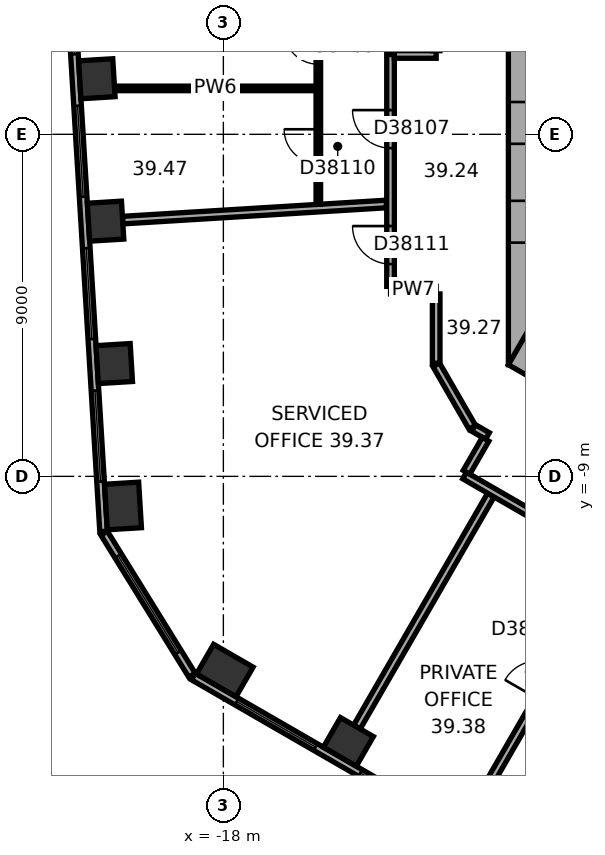
"""IFC4 building model, lengths in metres.
Left out: names, types, materials, properties, quantities, classifications, styles, units other than length and angle.
Written with IfcOpenShell. Run it as: python <this file> out.ifc"""

import sys

from ifc_helpers import new_model, si_unit, direction, frame, frame_2d, origin, origin_2d, place, context, subcontext, project, spatial, rectangle, extrude, element, fill, save


model = new_model("IFC4")
c1 = context("Model", 3, precision=1e-05, world=origin(), true_north=direction((0.0, 1.0)))
c2 = subcontext(c1, "Body", "Model", "MODEL_VIEW")
j1 = project(units=[si_unit("LENGTHUNIT", "METRE"), si_unit("PLANEANGLEUNIT", "RADIAN")], contexts=[c1])
p1 = place(None, origin())
s1 = spatial("IfcSite", under=j1, at=p1, CompositionType="ELEMENT")
p2 = place(p1, origin())
s2 = spatial("IfcBuilding", under=s1, at=p2, CompositionType="ELEMENT")
p3 = place(p2, frame((0.0, 0.0, 161.4)))
s3 = spatial("IfcBuildingStorey", under=s2, at=p3, CompositionType="ELEMENT", Elevation=161.4)
for number, where, z_axis, x_axis in (
    (1, (-21.329, 1.462, 0.0), (0.0, 0.0, 1.0), (0.061, -0.998, 0.0)),
    (2, (-21.1, -2.285, 0.0), (0.0, 0.0, 1.0), (0.061, -0.998, 0.0)),
    (3, (-20.871, -6.032, 0.0), (0.0, 0.0, 1.0), (0.061, -0.998, 0.0)),
):
    element("IfcColumn", number, at=place(p3, frame(where, z_axis=z_axis, x_axis=x_axis)), inside=s3, PredefinedType="COLUMN", context=c2, shape_type="SweptSolid", body=[
        extrude(rectangle(XDim=1.0, YDim=0.9, at=origin_2d()), origin(), (0.0, 0.0, 1.0), 3.7),
    ])
for number, where, z_axis, x_axis in (
    (4, (-20.642, -9.779, 0.0), (0.0, 0.0, 1.0), (0.061, -0.998, 0.0)),
    (5, (-17.962, -14.109, 0.0), (0.0, 0.0, 1.0), (0.866, -0.5, 0.0)),
):
    element("IfcColumn", number, at=place(p3, frame(where, z_axis=z_axis, x_axis=x_axis)), inside=s3, PredefinedType="COLUMN", context=c2, shape_type="SweptSolid", body=[
        extrude(rectangle(XDim=1.2, YDim=0.9, at=origin_2d()), origin(), (0.0, 0.0, 1.0), 3.7),
    ])
p4 = place(p3, frame((-14.711, -15.986, 0.0), z_axis=(0.0, 0.0, 1.0), x_axis=(0.866025403784, -0.5, 0.0)))
e6 = element("IfcColumn", 6, at=p4, inside=s3, PredefinedType="COLUMN", context=c2, shape_type="SweptSolid", body=[
    extrude(rectangle(XDim=1.0, YDim=0.9, at=origin_2d()), origin(), (0.0, 0.0, 1.0), 3.7),
])
p5 = place(p3, frame((-10.0, 6.062, 0.0), z_axis=(0.0, 0.0, 1.0), x_axis=(0.0, -1.0, 0.0)))
e7 = element("IfcWall", 7, at=p5, inside=s3, PredefinedType="SHEAR", context=c2, shape_type="SweptSolid", body=[
    extrude(rectangle(XDim=12.125, YDim=1.0, at=frame_2d((6.062, 0.0))), origin(), (0.0, 0.0, 1.0), 3.7),
])
p6 = place(p5, frame((5.212, 0.0, 0.0)))
e8 = element("IfcOpeningElement", 8, at=p6, cuts=e7, PredefinedType="OPENING", context=c2, shape_type="SweptSolid", body=[
    extrude(rectangle(XDim=1.1, YDim=2.1, at=frame_2d((0.55, 1.05))), frame((0.0, 0.51, 0.0), z_axis=(0.0, -1.0, 0.0), x_axis=(1.0, 0.0, 0.0)), (0.0, 0.0, 1.0), 1.02),
])
p7 = place(p5, frame((7.812, 0.0, 0.0)))
e9 = element("IfcOpeningElement", 9, at=p7, cuts=e7, PredefinedType="OPENING", context=c2, shape_type="SweptSolid", body=[
    extrude(rectangle(XDim=1.1, YDim=2.1, at=frame_2d((0.55, 1.05))), frame((0.0, 0.51, 0.0), z_axis=(0.0, -1.0, 0.0), x_axis=(1.0, 0.0, 0.0)), (0.0, 0.0, 1.0), 1.02),
])
p8 = place(p3, frame((-10.25, -5.629, 0.0), z_axis=(0.0, 0.0, 1.0), x_axis=(0.866022616891, -0.50000482701, 0.0)))
e10 = element("IfcWall", 10, at=p8, inside=s3, PredefinedType="SHEAR", context=c2, shape_type="SweptSolid", body=[
    extrude(rectangle(XDim=12.125, YDim=1.0, at=frame_2d((6.062, 0.0))), origin(), (0.0, 0.0, 1.0), 3.7),
])
p9 = place(p8, frame((6.262, 0.0, 0.0)))
e11 = element("IfcOpeningElement", 11, at=p9, cuts=e10, PredefinedType="OPENING", context=c2, shape_type="SweptSolid", body=[
    extrude(rectangle(XDim=1.5, YDim=2.1, at=frame_2d((0.75, 1.05))), frame((0.0, 0.51, 0.0), z_axis=(0.0, -1.0, 0.0), x_axis=(1.0, 0.0, 0.0)), (0.0, 0.0, 1.0), 1.02),
])
p10 = place(p8, frame((1.712, 0.0, 0.0)))
e12 = element("IfcOpeningElement", 12, at=p10, cuts=e10, PredefinedType="OPENING", context=c2, shape_type="SweptSolid", body=[
    extrude(rectangle(XDim=1.1, YDim=2.1, at=frame_2d((0.55, 1.05))), frame((0.0, 0.51, 0.0), z_axis=(0.0, -1.0, 0.0), x_axis=(1.0, 0.0, 0.0)), (0.0, 0.0, 1.0), 1.02),
])
p11 = place(p8, frame((4.312, 0.0, 0.0)))
e13 = element("IfcOpeningElement", 13, at=p11, cuts=e10, PredefinedType="OPENING", context=c2, shape_type="SweptSolid", body=[
    extrude(rectangle(XDim=1.1, YDim=2.1, at=frame_2d((0.55, 1.05))), frame((0.0, 0.51, 0.0), z_axis=(0.0, -1.0, 0.0), x_axis=(1.0, 0.0, 0.0)), (0.0, 0.0, 1.0), 1.02),
])
p12 = place(p3, frame((-22.375, 9.557, 0.0), z_axis=(0.0, 0.0, 1.0), x_axis=(0.061036015339, -0.998135564356, 0.0)))
e14 = element("IfcWall", 14, at=p12, inside=s3, PredefinedType="STANDARD", context=c2, shape_type="SweptSolid", body=[
    extrude(rectangle(XDim=20.044, YDim=0.2, at=frame_2d((10.022, 0.0))), origin(), (0.0, 0.0, 1.0), 3.7),
])
p13 = place(p12, frame((1.313, 0.0, 0.9)))
e15 = element("IfcOpeningElement", 15, at=p13, cuts=e14, PredefinedType="OPENING", context=c2, shape_type="SweptSolid", body=[
    extrude(rectangle(XDim=2.4, YDim=2.0, at=frame_2d((1.2, 1.0))), frame((0.0, 0.11, 0.0), z_axis=(0.0, -1.0, 0.0), x_axis=(1.0, 0.0, 0.0)), (0.0, 0.0, 1.0), 0.22),
])
p14 = place(p12, frame((5.067, 0.0, 0.9)))
e16 = element("IfcOpeningElement", 16, at=p14, cuts=e14, PredefinedType="OPENING", context=c2, shape_type="SweptSolid", body=[
    extrude(rectangle(XDim=2.4, YDim=2.0, at=frame_2d((1.2, 1.0))), frame((0.0, 0.11, 0.0), z_axis=(0.0, -1.0, 0.0), x_axis=(1.0, 0.0, 0.0)), (0.0, 0.0, 1.0), 0.22),
])
p15 = place(p12, frame((8.821, 0.0, 0.9)))
e17 = element("IfcOpeningElement", 17, at=p15, cuts=e14, PredefinedType="OPENING", context=c2, shape_type="SweptSolid", body=[
    extrude(rectangle(XDim=2.4, YDim=2.0, at=frame_2d((1.2, 1.0))), frame((0.0, 0.11, 0.0), z_axis=(0.0, -1.0, 0.0), x_axis=(1.0, 0.0, 0.0)), (0.0, 0.0, 1.0), 0.22),
])
p16 = place(p12, frame((12.575, 0.0, 0.9)))
e18 = element("IfcOpeningElement", 18, at=p16, cuts=e14, PredefinedType="OPENING", context=c2, shape_type="SweptSolid", body=[
    extrude(rectangle(XDim=2.4, YDim=2.0, at=frame_2d((1.2, 1.0))), frame((0.0, 0.11, 0.0), z_axis=(0.0, -1.0, 0.0), x_axis=(1.0, 0.0, 0.0)), (0.0, 0.0, 1.0), 0.22),
])
p17 = place(p12, frame((16.329, 0.0, 0.9)))
e19 = element("IfcOpeningElement", 19, at=p17, cuts=e14, PredefinedType="OPENING", context=c2, shape_type="SweptSolid", body=[
    extrude(rectangle(XDim=2.4, YDim=2.0, at=frame_2d((1.2, 1.0))), frame((0.0, 0.11, 0.0), z_axis=(0.0, -1.0, 0.0), x_axis=(1.0, 0.0, 0.0)), (0.0, 0.0, 1.0), 0.22),
])
p18 = place(p3, frame((-21.137, -10.496, 0.0), z_axis=(0.0, 0.0, 1.0), x_axis=(0.526178661629, -0.850374044786, 0.0)))
e20 = element("IfcWall", 20, at=p18, inside=s3, PredefinedType="STANDARD", context=c2, shape_type="SweptSolid", body=[
    extrude(rectangle(XDim=4.395, YDim=0.2, at=frame_2d((2.197, 0.0))), origin(), (0.0, 0.0, 1.0), 3.7),
])
p19 = place(p18, frame((0.698, 0.0, 0.9)))
e21 = element("IfcOpeningElement", 21, at=p19, cuts=e20, PredefinedType="OPENING", context=c2, shape_type="SweptSolid", body=[
    extrude(rectangle(XDim=3.0, YDim=2.0, at=frame_2d((1.5, 1.0))), frame((0.0, 0.11, 0.0), z_axis=(0.0, -1.0, 0.0), x_axis=(1.0, 0.0, 0.0)), (0.0, 0.0, 1.0), 0.22),
])
p20 = place(p3, frame((-18.789, -14.267, 0.0), z_axis=(0.0, 0.0, 1.0), x_axis=(0.866023315909, -0.500003616288, 0.0)))
e22 = element("IfcWall", 22, at=p20, inside=s3, PredefinedType="STANDARD", context=c2, shape_type="SweptSolid", body=[
    extrude(rectangle(XDim=20.044, YDim=0.2, at=frame_2d((10.022, 0.0))), origin(), (0.0, 0.0, 1.0), 3.7),
])
p21 = place(p20, frame((1.314, 0.0, 0.9)))
e23 = element("IfcOpeningElement", 23, at=p21, cuts=e22, PredefinedType="OPENING", context=c2, shape_type="SweptSolid", body=[
    extrude(rectangle(XDim=2.4, YDim=2.0, at=frame_2d((1.2, 1.0))), frame((0.0, 0.11, 0.0), z_axis=(0.0, -1.0, 0.0), x_axis=(1.0, 0.0, 0.0)), (0.0, 0.0, 1.0), 0.22),
])
p22 = place(p20, frame((5.069, 0.0, 0.9)))
e24 = element("IfcOpeningElement", 24, at=p22, cuts=e22, PredefinedType="OPENING", context=c2, shape_type="SweptSolid", body=[
    extrude(rectangle(XDim=2.4, YDim=2.0, at=frame_2d((1.2, 1.0))), frame((0.0, 0.11, 0.0), z_axis=(0.0, -1.0, 0.0), x_axis=(1.0, 0.0, 0.0)), (0.0, 0.0, 1.0), 0.22),
])
p23 = place(p20, frame((8.823, 0.0, 0.9)))
e25 = element("IfcOpeningElement", 25, at=p23, cuts=e22, PredefinedType="OPENING", context=c2, shape_type="SweptSolid", body=[
    extrude(rectangle(XDim=2.4, YDim=2.0, at=frame_2d((1.2, 1.0))), frame((0.0, 0.11, 0.0), z_axis=(0.0, -1.0, 0.0), x_axis=(1.0, 0.0, 0.0)), (0.0, 0.0, 1.0), 0.22),
])
p24 = place(p20, frame((12.577, 0.0, 0.9)))
e26 = element("IfcOpeningElement", 26, at=p24, cuts=e22, PredefinedType="OPENING", context=c2, shape_type="SweptSolid", body=[
    extrude(rectangle(XDim=2.4, YDim=2.0, at=frame_2d((1.2, 1.0))), frame((0.0, 0.11, 0.0), z_axis=(0.0, -1.0, 0.0), x_axis=(1.0, 0.0, 0.0)), (0.0, 0.0, 1.0), 0.22),
])
p25 = place(p20, frame((16.331, 0.0, 0.9)))
e27 = element("IfcOpeningElement", 27, at=p25, cuts=e22, PredefinedType="OPENING", context=c2, shape_type="SweptSolid", body=[
    extrude(rectangle(XDim=2.4, YDim=2.0, at=frame_2d((1.2, 1.0))), frame((0.0, 0.11, 0.0), z_axis=(0.0, -1.0, 0.0), x_axis=(1.0, 0.0, 0.0)), (0.0, 0.0, 1.0), 0.22),
])
p26 = place(p3, frame((-20.863, 1.208, 0.0), z_axis=(0.0, 0.0, 1.0), x_axis=(1.0, 0.0, 0.0)))
e28 = element("IfcWall", 28, at=p26, inside=s3, PredefinedType="PARTITIONING", context=c2, shape_type="SweptSolid", body=[
    extrude(rectangle(XDim=5.302, YDim=0.12, at=frame_2d((2.651, 0.0))), origin(), (0.0, 0.0, 1.0), 2.87),
])
p27 = place(p3, frame((-20.651, -2.258, 0.0), z_axis=(0.0, 0.0, 1.0), x_axis=(0.998133960965, 0.061062230286, 0.0)))
e29 = element("IfcWall", 29, at=p27, inside=s3, PredefinedType="PARTITIONING", context=c2, shape_type="SweptSolid", body=[
    extrude(rectangle(XDim=6.953, YDim=0.2, at=frame_2d((3.477, 0.0))), origin(), (0.0, 0.0, 1.0), 3.42),
])
p28 = place(p3, frame((-15.501, 5.479, 0.0), z_axis=(0.0, 0.0, 1.0), x_axis=(0.0, -1.0, 0.0)))
e30 = element("IfcWall", 30, at=p28, inside=s3, PredefinedType="PARTITIONING", context=c2, shape_type="SweptSolid", body=[
    extrude(rectangle(XDim=7.322, YDim=0.12, at=frame_2d((3.661, 0.0))), origin(), (0.0, 0.0, 1.0), 3.42),
])
p29 = place(p28, frame((0.55, 0.0, 0.0)))
e31 = element("IfcOpeningElement", 31, at=p29, cuts=e30, PredefinedType="OPENING", context=c2, shape_type="SweptSolid", body=[
    extrude(rectangle(XDim=1.0, YDim=2.1, at=frame_2d((0.5, 1.05))), frame((0.0, 0.07, 0.0), z_axis=(0.0, -1.0, 0.0), x_axis=(1.0, 0.0, 0.0)), (0.0, 0.0, 1.0), 0.14),
])
p30 = place(p28, frame((2.736, 0.0, 0.0)))
e32 = element("IfcOpeningElement", 32, at=p30, cuts=e30, PredefinedType="OPENING", context=c2, shape_type="SweptSolid", body=[
    extrude(rectangle(XDim=0.9, YDim=2.1, at=frame_2d((0.45, 1.05))), frame((0.0, 0.07, 0.0), z_axis=(0.0, -1.0, 0.0), x_axis=(1.0, 0.0, 0.0)), (0.0, 0.0, 1.0), 0.14),
])
p31 = place(p28, frame((5.347, 0.0, 0.0)))
e33 = element("IfcOpeningElement", 33, at=p31, cuts=e30, PredefinedType="OPENING", context=c2, shape_type="SweptSolid", body=[
    extrude(rectangle(XDim=0.9, YDim=2.1, at=frame_2d((0.45, 1.05))), frame((0.0, 0.07, 0.0), z_axis=(0.0, -1.0, 0.0), x_axis=(1.0, 0.0, 0.0)), (0.0, 0.0, 1.0), 0.14),
])
p32 = place(p3, frame((-14.486, -15.597, 0.0), z_axis=(0.0, 0.0, 1.0), x_axis=(0.499983284935, 0.866035054017, 0.0)))
e34 = element("IfcWall", 34, at=p32, inside=s3, PredefinedType="PARTITIONING", context=c2, shape_type="SweptSolid", body=[
    extrude(rectangle(XDim=7.049, YDim=0.2, at=frame_2d((3.524, 0.0))), origin(), (0.0, 0.0, 1.0), 3.42),
])
p33 = place(p3, frame((-13.601, -4.101, 0.0), z_axis=(0.0, 0.0, 1.0), x_axis=(1.0, 0.0, 0.0)))
e35 = element("IfcWall", 35, at=p33, inside=s3, PredefinedType="PARTITIONING", context=c2, shape_type="SweptSolid", body=[
    extrude(rectangle(XDim=1.201, YDim=0.2, at=frame_2d((0.601, 0.0))), origin(), (0.0, 0.0, 1.0), 3.42),
])
p34 = place(p3, frame((-13.601, 2.101, 0.0), z_axis=(0.0, 0.0, 1.0), x_axis=(0.0, -1.0, 0.0)))
e36 = element("IfcWall", 36, at=p34, inside=s3, PredefinedType="PARTITIONING", context=c2, shape_type="SweptSolid", body=[
    extrude(rectangle(XDim=6.102, YDim=0.2, at=frame_2d((3.051, 0.0))), origin(), (0.0, 0.0, 1.0), 3.42),
])
p35 = place(p34, frame((1.464, 0.0, 0.0)))
e37 = element("IfcOpeningElement", 37, at=p35, cuts=e36, PredefinedType="OPENING", context=c2, shape_type="SweptSolid", body=[
    extrude(rectangle(XDim=1.0, YDim=2.1, at=frame_2d((0.5, 1.05))), frame((0.0, 0.11, 0.0), z_axis=(0.0, -1.0, 0.0), x_axis=(1.0, 0.0, 0.0)), (0.0, 0.0, 1.0), 0.22),
])
p36 = place(p34, frame((4.515, 0.0, 0.0)))
e38 = element("IfcOpeningElement", 38, at=p36, cuts=e36, PredefinedType="OPENING", context=c2, shape_type="SweptSolid", body=[
    extrude(rectangle(XDim=1.0, YDim=2.1, at=frame_2d((0.5, 1.05))), frame((0.0, 0.11, 0.0), z_axis=(0.0, -1.0, 0.0), x_axis=(1.0, 0.0, 0.0)), (0.0, 0.0, 1.0), 0.22),
])
p37 = place(p3, frame((-12.4, -6.062, 0.0), z_axis=(0.0, 0.0, 1.0), x_axis=(0.500022797313, -0.86601224135, 0.0)))
e39 = element("IfcWall", 39, at=p37, inside=s3, PredefinedType="PARTITIONING", context=c2, shape_type="SweptSolid", body=[
    extrude(rectangle(XDim=1.9, YDim=0.2, at=frame_2d((0.95, 0.0))), origin(), (0.0, 0.0, 1.0), 3.42),
])
p38 = place(p3, frame((-12.4, -4.201, 0.0), z_axis=(0.0, 0.0, 1.0), x_axis=(0.0, -1.0, 0.0)))
e40 = element("IfcWall", 40, at=p38, inside=s3, PredefinedType="PARTITIONING", context=c2, shape_type="SweptSolid", body=[
    extrude(rectangle(XDim=1.821, YDim=0.2, at=frame_2d((0.911, 0.0))), origin(), (0.0, 0.0, 1.0), 3.42),
])
p39 = place(p3, frame((-12.4, 2.101, 0.0), z_axis=(0.0, 0.0, 1.0), x_axis=(-1.0, 0.0, 0.0)))
e41 = element("IfcWall", 41, at=p39, inside=s3, PredefinedType="PARTITIONING", context=c2, shape_type="SweptSolid", body=[
    extrude(rectangle(XDim=1.101, YDim=0.2, at=frame_2d((0.551, 0.0))), origin(), (0.0, 0.0, 1.0), 3.42),
])
p40 = place(p3, frame((-11.651, -8.978, 0.0), z_axis=(0.0, 0.0, 1.0), x_axis=(0.866010893236, -0.500025132165, 0.0)))
e42 = element("IfcWall", 42, at=p40, inside=s3, PredefinedType="PARTITIONING", context=c2, shape_type="SweptSolid", body=[
    extrude(rectangle(XDim=4.608, YDim=0.2, at=frame_2d((2.304, 0.0))), origin(), (0.0, 0.0, 1.0), 3.42),
])
p41 = place(p3, frame((-11.415, -7.728, 0.0), z_axis=(0.0, 0.0, 1.0), x_axis=(0.865915281873, -0.500190688257, 0.0)))
e43 = element("IfcWall", 43, at=p41, inside=s3, PredefinedType="PARTITIONING", context=c2, shape_type="SweptSolid", body=[
    extrude(rectangle(XDim=0.421, YDim=0.2, at=frame_2d((0.21, 0.0))), origin(), (0.0, 0.0, 1.0), 3.42),
])
p42 = place(p3, frame((-11.235, -17.474, 0.0), z_axis=(0.0, 0.0, 1.0), x_axis=(0.500009260695, 0.866020057054, 0.0)))
e44 = element("IfcWall", 44, at=p42, inside=s3, PredefinedType="PARTITIONING", context=c2, shape_type="SweptSolid", body=[
    extrude(rectangle(XDim=7.049, YDim=0.2, at=frame_2d((3.524, 0.0))), origin(), (0.0, 0.0, 1.0), 2.87),
])
p43 = place(p42, frame((3.024, 0.0, 0.0)))
e45 = element("IfcOpeningElement", 45, at=p43, cuts=e44, PredefinedType="OPENING", context=c2, shape_type="SweptSolid", body=[
    extrude(rectangle(XDim=1.0, YDim=2.1, at=frame_2d((0.5, 1.05))), frame((0.0, 0.11, 0.0), z_axis=(0.0, -1.0, 0.0), x_axis=(1.0, 0.0, 0.0)), (0.0, 0.0, 1.0), 0.22),
])
p44 = place(p3, frame((-11.101, -8.025, 0.0), z_axis=(0.0, 0.0, 1.0), x_axis=(-0.500074377092, -0.865982457891, 0.0)))
e46 = element("IfcWall", 46, at=p44, inside=s3, PredefinedType="PARTITIONING", context=c2, shape_type="SweptSolid", body=[
    extrude(rectangle(XDim=1.001, YDim=0.2, at=frame_2d((0.5, 0.0))), origin(), (0.0, 0.0, 1.0), 3.42),
])
p45 = place(p14, origin())
e47 = element("IfcWindow", 47, at=p45, inside=s3, PartitioningType="SINGLE_PANEL", PredefinedType="WINDOW", context=c2, shape_type="SweptSolid", body=[
    extrude(rectangle(XDim=2.4, YDim=2.0, at=frame_2d((1.2, 1.0))), frame((0.0, 0.03, 0.0), z_axis=(0.0, -1.0, 0.0), x_axis=(1.0, 0.0, 0.0)), (0.0, 0.0, 1.0), 0.06),
])
fill(e16, e47)
p46 = place(p15, origin())
e48 = element("IfcWindow", 48, at=p46, inside=s3, PartitioningType="SINGLE_PANEL", PredefinedType="WINDOW", context=c2, shape_type="SweptSolid", body=[
    extrude(rectangle(XDim=2.4, YDim=2.0, at=frame_2d((1.2, 1.0))), frame((0.0, 0.03, 0.0), z_axis=(0.0, -1.0, 0.0), x_axis=(1.0, 0.0, 0.0)), (0.0, 0.0, 1.0), 0.06),
])
fill(e17, e48)
p47 = place(p16, origin())
e49 = element("IfcWindow", 49, at=p47, inside=s3, PartitioningType="SINGLE_PANEL", PredefinedType="WINDOW", context=c2, shape_type="SweptSolid", body=[
    extrude(rectangle(XDim=2.4, YDim=2.0, at=frame_2d((1.2, 1.0))), frame((0.0, 0.03, 0.0), z_axis=(0.0, -1.0, 0.0), x_axis=(1.0, 0.0, 0.0)), (0.0, 0.0, 1.0), 0.06),
])
fill(e18, e49)
p48 = place(p17, origin())
e50 = element("IfcWindow", 50, at=p48, inside=s3, PartitioningType="SINGLE_PANEL", PredefinedType="WINDOW", context=c2, shape_type="SweptSolid", body=[
    extrude(rectangle(XDim=2.4, YDim=2.0, at=frame_2d((1.2, 1.0))), frame((0.0, 0.03, 0.0), z_axis=(0.0, -1.0, 0.0), x_axis=(1.0, 0.0, 0.0)), (0.0, 0.0, 1.0), 0.06),
])
fill(e19, e50)
p49 = place(p19, origin())
e51 = element("IfcWindow", 51, at=p49, inside=s3, PartitioningType="SINGLE_PANEL", PredefinedType="WINDOW", context=c2, shape_type="SweptSolid", body=[
    extrude(rectangle(XDim=3.0, YDim=2.0, at=frame_2d((1.5, 1.0))), frame((0.0, 0.03, 0.0), z_axis=(0.0, -1.0, 0.0), x_axis=(1.0, 0.0, 0.0)), (0.0, 0.0, 1.0), 0.06),
])
fill(e21, e51)
p50 = place(p21, origin())
e52 = element("IfcWindow", 52, at=p50, inside=s3, PartitioningType="SINGLE_PANEL", PredefinedType="WINDOW", context=c2, shape_type="SweptSolid", body=[
    extrude(rectangle(XDim=2.4, YDim=2.0, at=frame_2d((1.2, 1.0))), frame((0.0, 0.03, 0.0), z_axis=(0.0, -1.0, 0.0), x_axis=(1.0, 0.0, 0.0)), (0.0, 0.0, 1.0), 0.06),
])
fill(e23, e52)
p51 = place(p22, origin())
e53 = element("IfcWindow", 53, at=p51, inside=s3, PartitioningType="SINGLE_PANEL", PredefinedType="WINDOW", context=c2, shape_type="SweptSolid", body=[
    extrude(rectangle(XDim=2.4, YDim=2.0, at=frame_2d((1.2, 1.0))), frame((0.0, 0.03, 0.0), z_axis=(0.0, -1.0, 0.0), x_axis=(1.0, 0.0, 0.0)), (0.0, 0.0, 1.0), 0.06),
])
fill(e24, e53)
p52 = place(p35, origin())
e54 = element("IfcDoor", 54, at=p52, inside=s3, OperationType="SINGLE_SWING_LEFT", PredefinedType="DOOR", context=c2, shape_type="SweptSolid", body=[
    extrude(rectangle(XDim=1.0, YDim=2.1, at=frame_2d((0.5, 1.05))), frame((0.0, 0.025, 0.0), z_axis=(0.0, -1.0, 0.0), x_axis=(1.0, 0.0, 0.0)), (0.0, 0.0, 1.0), 0.05),
])
fill(e37, e54)
p53 = place(p30, origin())
e55 = element("IfcDoor", 55, at=p53, inside=s3, OperationType="SINGLE_SWING_LEFT", PredefinedType="DOOR", context=c2, shape_type="SweptSolid", body=[
    extrude(rectangle(XDim=0.9, YDim=2.1, at=frame_2d((0.45, 1.05))), frame((0.0, 0.025, 0.0), z_axis=(0.0, -1.0, 0.0), x_axis=(1.0, 0.0, 0.0)), (0.0, 0.0, 1.0), 0.05),
])
fill(e32, e55)
p54 = place(p31, origin())
e56 = element("IfcDoor", 56, at=p54, inside=s3, OperationType="SINGLE_SWING_LEFT", PredefinedType="DOOR", context=c2, shape_type="SweptSolid", body=[
    extrude(rectangle(XDim=0.9, YDim=2.1, at=frame_2d((0.45, 1.05))), frame((0.0, 0.025, 0.0), z_axis=(0.0, -1.0, 0.0), x_axis=(1.0, 0.0, 0.0)), (0.0, 0.0, 1.0), 0.05),
])
fill(e33, e56)
p55 = place(p36, origin())
e57 = element("IfcDoor", 57, at=p55, inside=s3, OperationType="SINGLE_SWING_LEFT", PredefinedType="DOOR", context=c2, shape_type="SweptSolid", body=[
    extrude(rectangle(XDim=1.0, YDim=2.1, at=frame_2d((0.5, 1.05))), frame((0.0, 0.025, 0.0), z_axis=(0.0, -1.0, 0.0), x_axis=(1.0, 0.0, 0.0)), (0.0, 0.0, 1.0), 0.05),
])
fill(e38, e57)
save(model, sys.argv[1])
